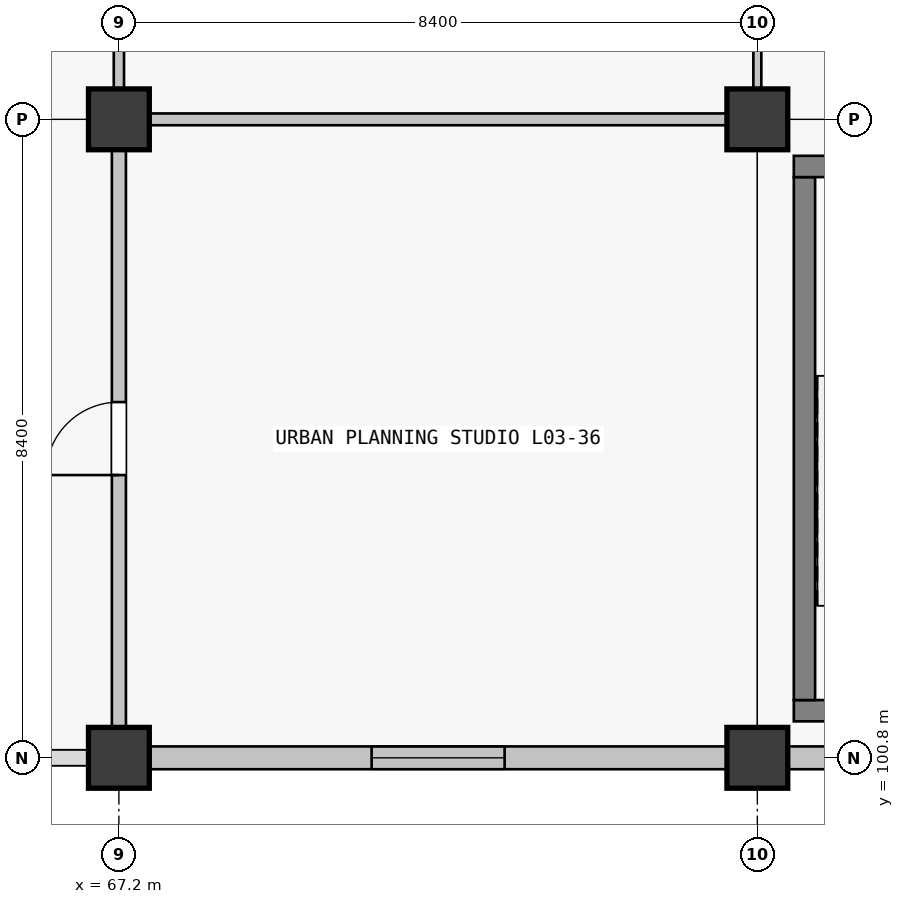
"""IFC4 building model, lengths in metres.
Left out: names, types, materials, properties, quantities, classifications, styles, units other than length and angle.
Written with IfcOpenShell. Run it as: python <this file> out.ifc"""

import sys

from ifc_helpers import new_model, si_unit, direction, frame, frame_2d, origin, origin_2d, place, context, subcontext, project, spatial, rectangle, extrude, element, fill, save


model = new_model("IFC4")
c1 = context("Model", 3, precision=1e-05, world=origin(), true_north=direction((0.0, 1.0)))
c2 = subcontext(c1, "Body", "Model", "MODEL_VIEW")
j1 = project(units=[si_unit("LENGTHUNIT", "METRE"), si_unit("PLANEANGLEUNIT", "RADIAN")], contexts=[c1])
p1 = place(None, origin())
s1 = spatial("IfcSite", under=j1, at=p1, CompositionType="ELEMENT")
p2 = place(p1, origin())
s2 = spatial("IfcBuilding", under=s1, at=p2, CompositionType="ELEMENT")
p3 = place(p2, frame((0.0, 0.0, 14.76)))
s3 = spatial("IfcBuildingStorey", under=s2, at=p3, CompositionType="ELEMENT", Elevation=14.76)
for number, where, z_axis, x_axis in (
    (1, (67.2, 100.8, 0.0), (0.0, 0.0, 1.0), (1.0, 0.0, 0.0)),
    (2, (67.2, 109.2, 0.0), (0.0, 0.0, 1.0), (1.0, 0.0, 0.0)),
    (3, (75.6, 100.8, 0.0), (0.0, 0.0, 1.0), (1.0, 0.0, 0.0)),
    (4, (75.6, 109.2, 0.0), (0.0, 0.0, 1.0), (1.0, 0.0, 0.0)),
):
    element("IfcColumn", number, at=place(p3, frame(where, z_axis=z_axis, x_axis=x_axis)), inside=s3, PredefinedType="COLUMN", context=c2, shape_type="SweptSolid", body=[
        extrude(rectangle(XDim=0.8, YDim=0.8, at=origin_2d()), origin(), (0.0, 0.0, 1.0), 4.32),
    ])
p4 = place(p3, frame((75.199, 100.8, 0.0), z_axis=(0.0, 0.0, 1.0), x_axis=(-1.0, 0.0, 0.0)))
e5 = element("IfcWall", 5, at=p4, inside=s3, PredefinedType="SOLIDWALL", context=c2, shape_type="SweptSolid", body=[
    extrude(rectangle(XDim=7.598, YDim=0.3, at=frame_2d((3.799, 0.0))), origin(), (0.0, 0.0, 1.0), 3.37),
])
p5 = place(p4, frame((2.924, 0.0, 0.9)))
e6 = element("IfcOpeningElement", 6, at=p5, cuts=e5, PredefinedType="OPENING", context=c2, shape_type="SweptSolid", body=[
    extrude(rectangle(XDim=1.75, YDim=1.95, at=frame_2d((0.875, 0.975))), frame((0.0, 0.15, 0.0), z_axis=(0.0, -1.0, 0.0), x_axis=(1.0, 0.0, 0.0)), (0.0, 0.0, 1.0), 0.3),
])
p6 = place(p3, frame((83.599, 100.8, 0.0), z_axis=(0.0, 0.0, 1.0), x_axis=(-1.0, 0.0, 0.0)))
e7 = element("IfcWall", 7, at=p6, inside=s3, PredefinedType="SOLIDWALL", context=c2, shape_type="SweptSolid", body=[
    extrude(rectangle(XDim=7.598, YDim=0.3, at=frame_2d((3.799, 0.0))), origin(), (0.0, 0.0, 1.0), 3.37),
])
p7 = place(p3, frame((83.52, 101.42, 0.0), z_axis=(0.0, 0.0, 1.0), x_axis=(-1.0, 0.0, 0.0)))
e8 = element("IfcWall", 8, at=p7, inside=s3, PredefinedType="SHEAR", context=c2, shape_type="SweptSolid", body=[
    extrude(rectangle(XDim=7.44, YDim=0.28, at=frame_2d((3.72, 0.0))), origin(), (0.0, 0.0, 1.0), 4.32),
])
p8 = place(p3, frame((76.22, 101.56, 0.0), z_axis=(0.0, 0.0, 1.0), x_axis=(0.0, 1.0, 0.0)))
e9 = element("IfcWall", 9, at=p8, inside=s3, PredefinedType="SHEAR", context=c2, shape_type="SweptSolid", body=[
    extrude(rectangle(XDim=6.88, YDim=0.28, at=frame_2d((3.44, 0.0))), origin(), (0.0, 0.0, 1.0), 4.32),
])
p9 = place(p3, frame((76.08, 108.58, 0.0), z_axis=(0.0, 0.0, 1.0), x_axis=(1.0, 0.0, 0.0)))
e10 = element("IfcWall", 10, at=p9, inside=s3, PredefinedType="SHEAR", context=c2, shape_type="SweptSolid", body=[
    extrude(rectangle(XDim=7.44, YDim=0.28, at=frame_2d((3.72, 0.0))), origin(), (0.0, 0.0, 1.0), 4.32),
])
p10 = place(p3, frame((67.602, 109.2, 0.0), z_axis=(0.0, 0.0, 1.0), x_axis=(1.0, 0.0, 0.0)))
e11 = element("IfcWall", 11, at=p10, inside=s3, PredefinedType="PARTITIONING", context=c2, shape_type="SweptSolid", body=[
    extrude(rectangle(XDim=7.596, YDim=0.155, at=frame_2d((3.798, 0.0))), origin(), (0.0, 0.0, 1.0), 3.19),
])
p11 = place(p3, frame((67.2, 101.202, 0.0), z_axis=(0.0, 0.0, 1.0), x_axis=(0.0, 1.0, 0.0)))
e12 = element("IfcWall", 12, at=p11, inside=s3, PredefinedType="PARTITIONING", context=c2, shape_type="SweptSolid", body=[
    extrude(rectangle(XDim=7.596, YDim=0.185, at=frame_2d((3.798, 0.0))), origin(), (0.0, 0.0, 1.0), 3.19),
])
p12 = place(p11, frame((3.318, 0.0, 0.0)))
e13 = element("IfcOpeningElement", 13, at=p12, cuts=e12, PredefinedType="OPENING", context=c2, shape_type="SweptSolid", body=[
    extrude(rectangle(XDim=0.96, YDim=2.18, at=frame_2d((0.48, 1.09))), frame((0.0, 0.093, 0.0), z_axis=(0.0, -1.0, 0.0), x_axis=(1.0, 0.0, 0.0)), (0.0, 0.0, 1.0), 0.185),
])
p13 = place(p3, frame((67.2, 109.602, 0.0), z_axis=(0.0, 0.0, 1.0), x_axis=(0.0, 1.0, 0.0)))
e14 = element("IfcWall", 14, at=p13, inside=s3, PredefinedType="PARTITIONING", context=c2, shape_type="SweptSolid", body=[
    extrude(rectangle(XDim=7.621, YDim=0.135, at=frame_2d((3.811, 0.0))), origin(), (0.0, 0.0, 1.0), 3.19),
])
p14 = place(p13, frame((0.573, 0.0, 0.0)))
e15 = element("IfcOpeningElement", 15, at=p14, cuts=e14, PredefinedType="OPENING", context=c2, shape_type="SweptSolid", body=[
    extrude(rectangle(XDim=0.98, YDim=2.08, at=frame_2d((0.49, 1.04))), frame((0.0, 0.067, 0.0), z_axis=(0.0, -1.0, 0.0), x_axis=(1.0, 0.0, 0.0)), (0.0, 0.0, 1.0), 0.135),
])
p15 = place(p13, frame((4.513, 0.0, 0.0)))
e16 = element("IfcOpeningElement", 16, at=p15, cuts=e14, PredefinedType="OPENING", context=c2, shape_type="SweptSolid", body=[
    extrude(rectangle(XDim=0.94, YDim=2.08, at=frame_2d((0.47, 1.04))), frame((0.0, 0.067, 0.0), z_axis=(0.0, -1.0, 0.0), x_axis=(1.0, 0.0, 0.0)), (0.0, 0.0, 1.0), 0.135),
])
p16 = place(p3, frame((75.6, 109.602, 0.0), z_axis=(0.0, 0.0, 1.0), x_axis=(0.0, 1.0, 0.0)))
e17 = element("IfcWall", 17, at=p16, inside=s3, PredefinedType="PARTITIONING", context=c2, shape_type="SweptSolid", body=[
    extrude(rectangle(XDim=7.646, YDim=0.105, at=frame_2d((3.823, 0.0))), origin(), (0.0, 0.0, 1.0), 3.19),
])
p17 = place(p5, origin())
e18 = element("IfcWindow", 18, at=p17, inside=s3, PartitioningType="SINGLE_PANEL", PredefinedType="WINDOW", context=c2, shape_type="SweptSolid", body=[
    extrude(rectangle(XDim=1.75, YDim=1.95, at=frame_2d((0.875, 0.975))), frame((0.0, 0.03, 0.0), z_axis=(0.0, -1.0, 0.0), x_axis=(1.0, 0.0, 0.0)), (0.0, 0.0, 1.0), 0.06),
])
fill(e6, e18)
p18 = place(p12, origin())
e19 = element("IfcDoor", 19, at=p18, inside=s3, OperationType="SINGLE_SWING_LEFT", PredefinedType="DOOR", context=c2, shape_type="SweptSolid", body=[
    extrude(rectangle(XDim=0.96, YDim=2.18, at=frame_2d((0.48, 1.09))), frame((0.0, 0.025, 0.0), z_axis=(0.0, -1.0, 0.0), x_axis=(1.0, 0.0, 0.0)), (0.0, 0.0, 1.0), 0.05),
])
fill(e13, e19)
save(model, sys.argv[1])
